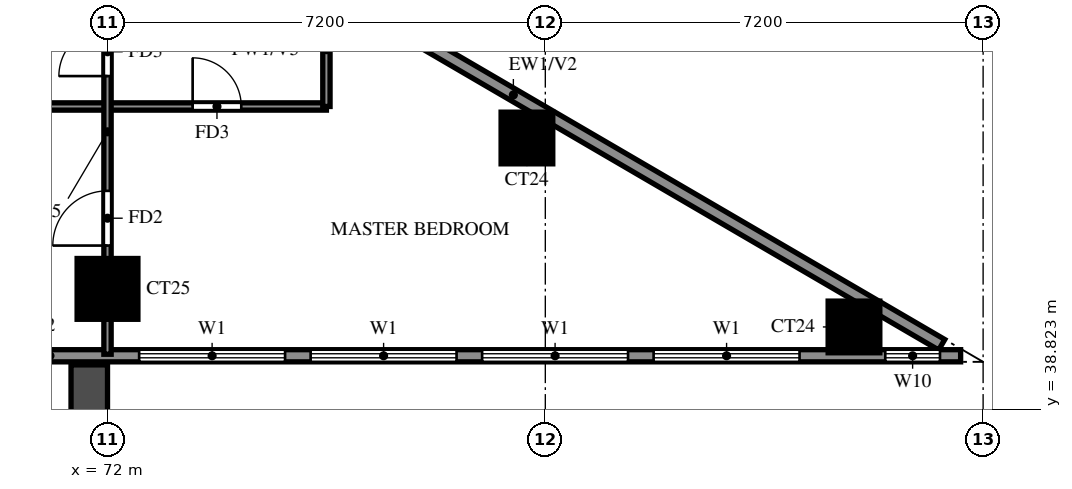
"""IFC4 building model, lengths in metres.
Left out: names, types, materials, properties, quantities, classifications, styles, units other than length and angle.
Written with IfcOpenShell. Run it as: python <this file> out.ifc"""

import sys

from ifc_helpers import new_model, si_unit, direction, frame, frame_2d, origin, origin_2d, place, context, subcontext, project, spatial, rectangle, extrude, source, transform, mapped, element, fill, save


model = new_model("IFC4")
c1 = context("Model", 3, precision=1e-05, world=origin(), true_north=direction((0.0, 1.0)))
c2 = subcontext(c1, "Body", "Model", "MODEL_VIEW")
j1 = project(units=[si_unit("LENGTHUNIT", "METRE"), si_unit("PLANEANGLEUNIT", "RADIAN")], contexts=[c1])
p1 = place(None, origin())
s1 = spatial("IfcSite", under=j1, at=p1, CompositionType="ELEMENT")
p2 = place(p1, origin())
s2 = spatial("IfcBuilding", under=s1, at=p2, CompositionType="ELEMENT")
p3 = place(p2, frame((0.0, 0.0, 160.5)))
s3 = spatial("IfcBuildingStorey", under=s2, at=p3, CompositionType="ELEMENT", Elevation=160.5)
m1 = source(origin(), c2, "Body", "SweptSolid", [
    extrude(rectangle(XDim=0.85, YDim=0.85, at=origin_2d()), origin(), (0.0, 0.0, 1.0), 3.2),
])
p4 = place(p3, frame((84.276, 40.174, 0.0), z_axis=(0.0, 0.0, 1.0), x_axis=(1.0, 0.0, 0.0)))
e1 = element("IfcColumn", 1, at=p4, inside=s3, PredefinedType="COLUMN", context=c2, shape_type="MappedRepresentation", body=[
    mapped(m1, transform((0.0, 0.0, 0.0))),
])
m2 = source(origin(), c2, "Body", "SweptSolid", [
    extrude(rectangle(XDim=1.0, YDim=1.0, at=origin_2d()), origin(), (0.0, 0.0, 1.0), 3.2),
])
p5 = place(p3, frame((72.0, 40.8, 0.0), z_axis=(0.0, 0.0, 1.0), x_axis=(1.0, 0.0, 0.0)))
e2 = element("IfcColumn", 2, at=p5, inside=s3, PredefinedType="COLUMN", context=c2, shape_type="MappedRepresentation", body=[
    mapped(m2, transform((0.0, 0.0, 0.0))),
])
p6 = place(p3, frame((78.898, 43.282, 0.0), z_axis=(0.0, 0.0, 1.0), x_axis=(1.0, 0.0, 0.0)))
e3 = element("IfcColumn", 3, at=p6, inside=s3, PredefinedType="COLUMN", context=c2, shape_type="MappedRepresentation", body=[
    mapped(m1, transform((0.0, 0.0, 0.0))),
])
p7 = place(p3, frame((85.719, 39.881, 0.0), z_axis=(0.0, 0.0, 1.0), x_axis=(-0.86377618652, 0.503875678716, 0.0)))
e4 = element("IfcWall", 4, at=p7, inside=s3, PredefinedType="SOLIDWALL", context=c2, shape_type="SweptSolid", body=[
    extrude(rectangle(XDim=16.311, YDim=0.2, at=frame_2d((8.156, 0.0))), origin(), (0.0, 0.0, 1.0), 3.2),
])
p8 = place(p7, frame((13.326, 0.0, 1.5)))
e5 = element("IfcOpeningElement", 5, at=p8, cuts=e4, PredefinedType="OPENING", context=c2, shape_type="SweptSolid", body=[
    extrude(rectangle(XDim=0.9, YDim=0.9, at=frame_2d((0.45, 0.45))), frame((0.0, 0.11, 0.0), z_axis=(0.0, -1.0, 0.0), x_axis=(1.0, 0.0, 0.0)), (0.0, 0.0, 1.0), 0.22),
])
p9 = place(p3, frame((58.8, 39.7, 0.0), z_axis=(0.0, 0.0, 1.0), x_axis=(1.0, 0.0, 0.0)))
e6 = element("IfcWall", 6, at=p9, inside=s3, PredefinedType="SOLIDWALL", context=c2, shape_type="SweptSolid", body=[
    extrude(rectangle(XDim=27.23, YDim=0.2, at=frame_2d((13.615, 0.0))), origin(), (0.0, 0.0, 1.0), 3.2),
])
p10 = place(p9, frame((7.5, 0.0, 0.0)))
e7 = element("IfcOpeningElement", 7, at=p10, cuts=e6, PredefinedType="OPENING", context=c2, shape_type="SweptSolid", body=[
    extrude(rectangle(XDim=1.8, YDim=2.4, at=frame_2d((0.9, 1.2))), frame((0.0, 0.11, 0.0), z_axis=(0.0, -1.0, 0.0), x_axis=(1.0, 0.0, 0.0)), (0.0, 0.0, 1.0), 0.22),
])
p11 = place(p9, frame((2.4, 0.0, 0.6)))
e8 = element("IfcOpeningElement", 8, at=p11, cuts=e6, PredefinedType="OPENING", context=c2, shape_type="SweptSolid", body=[
    extrude(rectangle(XDim=2.4, YDim=2.4, at=frame_2d((1.2, 1.2))), frame((0.0, 0.11, 0.0), z_axis=(0.0, -1.0, 0.0), x_axis=(1.0, 0.0, 0.0)), (0.0, 0.0, 1.0), 0.22),
])
p12 = place(p9, frame((13.72, 0.0, 0.6)))
e9 = element("IfcOpeningElement", 9, at=p12, cuts=e6, PredefinedType="OPENING", context=c2, shape_type="SweptSolid", body=[
    extrude(rectangle(XDim=2.4, YDim=2.4, at=frame_2d((1.2, 1.2))), frame((0.0, 0.11, 0.0), z_axis=(0.0, -1.0, 0.0), x_axis=(1.0, 0.0, 0.0)), (0.0, 0.0, 1.0), 0.22),
])
p13 = place(p9, frame((16.541, 0.0, 0.6)))
e10 = element("IfcOpeningElement", 10, at=p13, cuts=e6, PredefinedType="OPENING", context=c2, shape_type="SweptSolid", body=[
    extrude(rectangle(XDim=2.4, YDim=2.4, at=frame_2d((1.2, 1.2))), frame((0.0, 0.11, 0.0), z_axis=(0.0, -1.0, 0.0), x_axis=(1.0, 0.0, 0.0)), (0.0, 0.0, 1.0), 0.22),
])
p14 = place(p9, frame((19.361, 0.0, 0.6)))
e11 = element("IfcOpeningElement", 11, at=p14, cuts=e6, PredefinedType="OPENING", context=c2, shape_type="SweptSolid", body=[
    extrude(rectangle(XDim=2.4, YDim=2.4, at=frame_2d((1.2, 1.2))), frame((0.0, 0.11, 0.0), z_axis=(0.0, -1.0, 0.0), x_axis=(1.0, 0.0, 0.0)), (0.0, 0.0, 1.0), 0.22),
])
p15 = place(p9, frame((22.181, 0.0, 0.6)))
e12 = element("IfcOpeningElement", 12, at=p15, cuts=e6, PredefinedType="OPENING", context=c2, shape_type="SweptSolid", body=[
    extrude(rectangle(XDim=2.4, YDim=2.4, at=frame_2d((1.2, 1.2))), frame((0.0, 0.11, 0.0), z_axis=(0.0, -1.0, 0.0), x_axis=(1.0, 0.0, 0.0)), (0.0, 0.0, 1.0), 0.22),
])
p16 = place(p9, frame((25.99, 0.0, 0.6)))
e13 = element("IfcOpeningElement", 13, at=p16, cuts=e6, PredefinedType="OPENING", context=c2, shape_type="SweptSolid", body=[
    extrude(rectangle(XDim=0.9, YDim=2.4, at=frame_2d((0.45, 1.2))), frame((0.0, 0.11, 0.0), z_axis=(0.0, -1.0, 0.0), x_axis=(1.0, 0.0, 0.0)), (0.0, 0.0, 1.0), 0.22),
])
p17 = place(p3, frame((71.7, 39.55, 0.0), z_axis=(0.0, 0.0, 1.0), x_axis=(0.0, -1.0, 0.0)))
e14 = element("IfcWall", 14, at=p17, inside=s3, PredefinedType="SOLIDWALL", context=c2, shape_type="SweptSolid", body=[
    extrude(rectangle(XDim=2.65, YDim=0.6, at=frame_2d((1.325, 0.0))), origin(), (0.0, 0.0, 1.0), 2.85),
])
p18 = place(p3, frame((60.0, 43.8, 0.0), z_axis=(0.0, 0.0, 1.0), x_axis=(1.0, 0.0, 0.0)))
e15 = element("IfcWall", 15, at=p18, inside=s3, PredefinedType="PARTITIONING", context=c2, shape_type="SweptSolid", body=[
    extrude(rectangle(XDim=15.6, YDim=0.12, at=frame_2d((7.8, 0.0))), origin(), (0.0, 0.0, 1.0), 3.2),
])
p19 = place(p18, frame((9.75, 0.0, 0.0)))
e16 = element("IfcOpeningElement", 16, at=p19, cuts=e15, PredefinedType="OPENING", context=c2, shape_type="SweptSolid", body=[
    extrude(rectangle(XDim=0.9, YDim=2.1, at=frame_2d((0.45, 1.05))), frame((0.0, 0.07, 0.0), z_axis=(0.0, -1.0, 0.0), x_axis=(1.0, 0.0, 0.0)), (0.0, 0.0, 1.0), 0.14),
])
p20 = place(p18, frame((3.45, 0.0, 0.0)))
e17 = element("IfcOpeningElement", 17, at=p20, cuts=e15, PredefinedType="OPENING", context=c2, shape_type="SweptSolid", body=[
    extrude(rectangle(XDim=1.5, YDim=2.1, at=frame_2d((0.75, 1.05))), frame((0.0, 0.07, 0.0), z_axis=(0.0, -1.0, 0.0), x_axis=(1.0, 0.0, 0.0)), (0.0, 0.0, 1.0), 0.14),
])
p21 = place(p18, frame((13.4, 0.0, 0.0)))
e18 = element("IfcOpeningElement", 18, at=p21, cuts=e15, PredefinedType="OPENING", context=c2, shape_type="SweptSolid", body=[
    extrude(rectangle(XDim=0.8, YDim=2.1, at=frame_2d((0.4, 1.05))), frame((0.0, 0.07, 0.0), z_axis=(0.0, -1.0, 0.0), x_axis=(1.0, 0.0, 0.0)), (0.0, 0.0, 1.0), 0.14),
])
p22 = place(p3, frame((72.0, 39.725, 0.0), z_axis=(0.0, 0.0, 1.0), x_axis=(0.0, 1.0, 0.0)))
e19 = element("IfcWall", 19, at=p22, inside=s3, PredefinedType="PARTITIONING", context=c2, shape_type="SweptSolid", body=[
    extrude(rectangle(XDim=8.13, YDim=0.12, at=frame_2d((4.065, 0.0))), origin(), (0.0, 0.0, 1.0), 2.3),
])
p23 = place(p22, frame((1.788, 0.0, 0.0)))
e20 = element("IfcOpeningElement", 20, at=p23, cuts=e19, PredefinedType="OPENING", context=c2, shape_type="SweptSolid", body=[
    extrude(rectangle(XDim=0.9, YDim=2.1, at=frame_2d((0.45, 1.05))), frame((0.0, 0.07, 0.0), z_axis=(0.0, -1.0, 0.0), x_axis=(1.0, 0.0, 0.0)), (0.0, 0.0, 1.0), 0.14),
])
p24 = place(p22, frame((4.575, 0.0, 0.0)))
e21 = element("IfcOpeningElement", 21, at=p24, cuts=e19, PredefinedType="OPENING", context=c2, shape_type="SweptSolid", body=[
    extrude(rectangle(XDim=0.8, YDim=2.1, at=frame_2d((0.4, 1.05))), frame((0.0, 0.07, 0.0), z_axis=(0.0, -1.0, 0.0), x_axis=(1.0, 0.0, 0.0)), (0.0, 0.0, 1.0), 0.14),
])
p25 = place(p3, frame((75.6, 43.8, 0.0), z_axis=(0.0, 0.0, 1.0), x_axis=(0.0, 1.0, 0.0)))
e22 = element("IfcWall", 22, at=p25, inside=s3, PredefinedType="PARTITIONING", context=c2, shape_type="SweptSolid", body=[
    extrude(rectangle(XDim=1.868, YDim=0.12, at=frame_2d((0.934, 0.0))), origin(), (0.0, 0.0, 1.0), 2.3),
])
p26 = place(p12, origin())
e23 = element("IfcWindow", 23, at=p26, inside=s3, PartitioningType="DOUBLE_PANEL_VERTICAL", PredefinedType="WINDOW", context=c2, shape_type="SweptSolid", body=[
    extrude(rectangle(XDim=2.4, YDim=2.4, at=frame_2d((1.2, 1.2))), frame((0.0, 0.03, 0.0), z_axis=(0.0, -1.0, 0.0), x_axis=(1.0, 0.0, 0.0)), (0.0, 0.0, 1.0), 0.06),
])
fill(e9, e23)
p27 = place(p13, origin())
e24 = element("IfcWindow", 24, at=p27, inside=s3, PartitioningType="DOUBLE_PANEL_VERTICAL", PredefinedType="WINDOW", context=c2, shape_type="SweptSolid", body=[
    extrude(rectangle(XDim=2.4, YDim=2.4, at=frame_2d((1.2, 1.2))), frame((0.0, 0.03, 0.0), z_axis=(0.0, -1.0, 0.0), x_axis=(1.0, 0.0, 0.0)), (0.0, 0.0, 1.0), 0.06),
])
fill(e10, e24)
p28 = place(p14, origin())
e25 = element("IfcWindow", 25, at=p28, inside=s3, PartitioningType="DOUBLE_PANEL_VERTICAL", PredefinedType="WINDOW", context=c2, shape_type="SweptSolid", body=[
    extrude(rectangle(XDim=2.4, YDim=2.4, at=frame_2d((1.2, 1.2))), frame((0.0, 0.03, 0.0), z_axis=(0.0, -1.0, 0.0), x_axis=(1.0, 0.0, 0.0)), (0.0, 0.0, 1.0), 0.06),
])
fill(e11, e25)
p29 = place(p15, origin())
e26 = element("IfcWindow", 26, at=p29, inside=s3, PartitioningType="DOUBLE_PANEL_VERTICAL", PredefinedType="WINDOW", context=c2, shape_type="SweptSolid", body=[
    extrude(rectangle(XDim=2.4, YDim=2.4, at=frame_2d((1.2, 1.2))), frame((0.0, 0.03, 0.0), z_axis=(0.0, -1.0, 0.0), x_axis=(1.0, 0.0, 0.0)), (0.0, 0.0, 1.0), 0.06),
])
fill(e12, e26)
p30 = place(p16, origin())
e27 = element("IfcWindow", 27, at=p30, inside=s3, PartitioningType="SINGLE_PANEL", PredefinedType="WINDOW", context=c2, shape_type="SweptSolid", body=[
    extrude(rectangle(XDim=0.9, YDim=2.4, at=frame_2d((0.45, 1.2))), frame((0.0, 0.03, 0.0), z_axis=(0.0, -1.0, 0.0), x_axis=(1.0, 0.0, 0.0)), (0.0, 0.0, 1.0), 0.06),
])
fill(e13, e27)
p31 = place(p23, origin())
e28 = element("IfcDoor", 28, at=p31, inside=s3, OperationType="SINGLE_SWING_RIGHT", PredefinedType="DOOR", context=c2, shape_type="SweptSolid", body=[
    extrude(rectangle(XDim=0.9, YDim=2.1, at=frame_2d((0.45, 1.05))), frame((0.0, 0.025, 0.0), z_axis=(0.0, -1.0, 0.0), x_axis=(1.0, 0.0, 0.0)), (0.0, 0.0, 1.0), 0.05),
])
fill(e20, e28)
p32 = place(p24, origin())
e29 = element("IfcDoor", 29, at=p32, inside=s3, OperationType="SINGLE_SWING_LEFT", PredefinedType="DOOR", context=c2, shape_type="SweptSolid", body=[
    extrude(rectangle(XDim=0.8, YDim=2.1, at=frame_2d((0.4, 1.05))), frame((0.0, 0.025, 0.0), z_axis=(0.0, -1.0, 0.0), x_axis=(1.0, 0.0, 0.0)), (0.0, 0.0, 1.0), 0.05),
])
fill(e21, e29)
p33 = place(p21, origin())
e30 = element("IfcDoor", 30, at=p33, inside=s3, OperationType="SINGLE_SWING_RIGHT", PredefinedType="DOOR", context=c2, shape_type="SweptSolid", body=[
    extrude(rectangle(XDim=0.8, YDim=2.1, at=frame_2d((0.4, 1.05))), frame((0.0, 0.025, 0.0), z_axis=(0.0, -1.0, 0.0), x_axis=(1.0, 0.0, 0.0)), (0.0, 0.0, 1.0), 0.05),
])
fill(e18, e30)
save(model, sys.argv[1])
